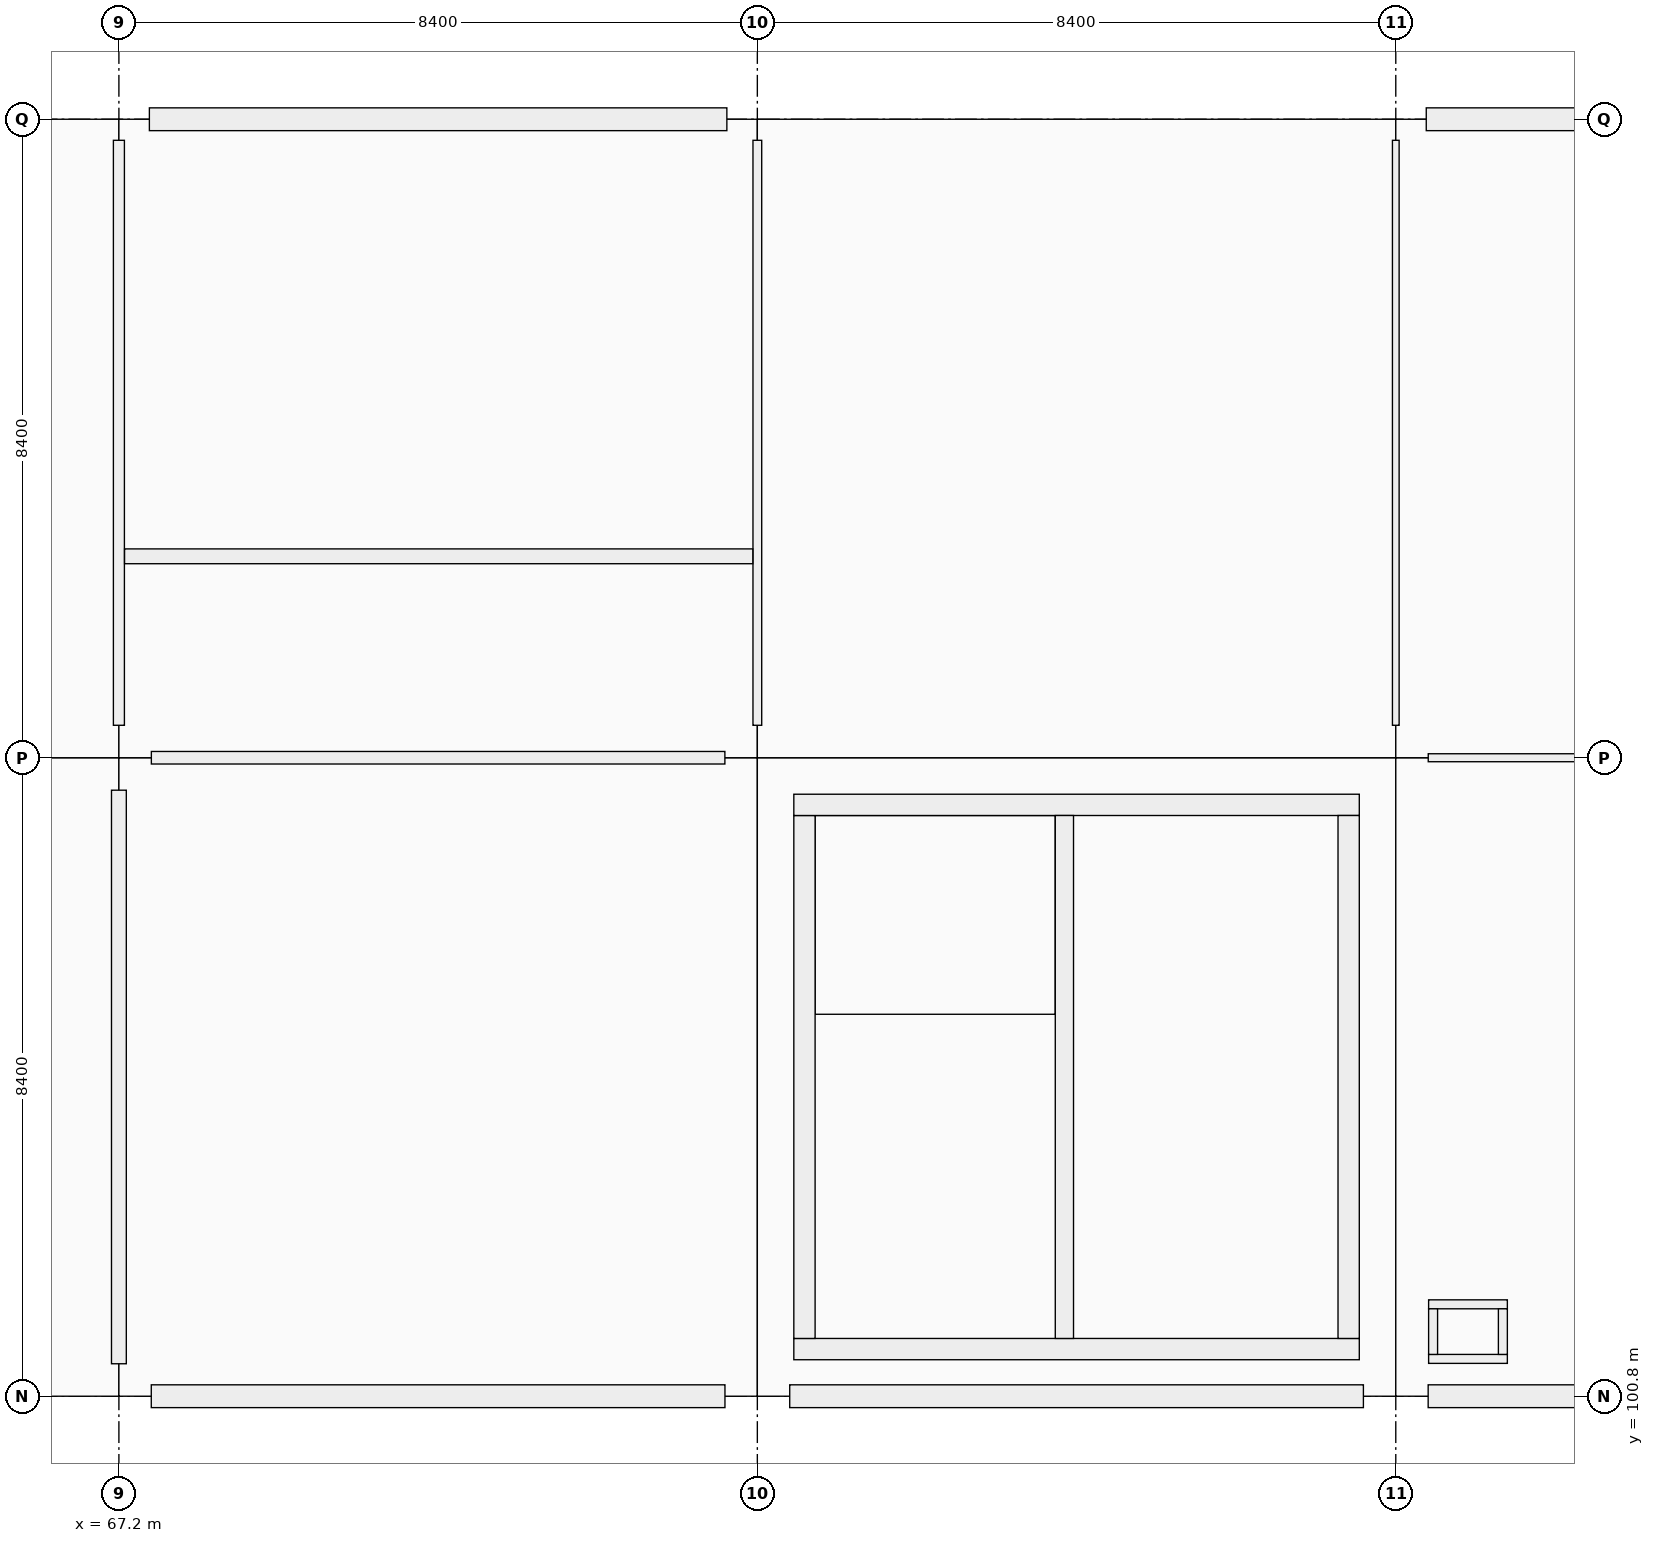
"""IFC4 building model, lengths in metres.
Left out: names, types, materials, properties, quantities, classifications, styles, units other than length and angle.
Written with IfcOpenShell. Run it as: python <this file> out.ifc"""

import sys

from ifc_helpers import new_model, si_unit, direction, frame, frame_2d, origin, origin_2d, place, context, subcontext, project, spatial, rectangle, extrude, element, fill, save


model = new_model("IFC4")
c1 = context("Model", 3, precision=1e-05, world=origin(), true_north=direction((0.0, 1.0)))
c2 = subcontext(c1, "Body", "Model", "MODEL_VIEW")
j1 = project(units=[si_unit("LENGTHUNIT", "METRE"), si_unit("PLANEANGLEUNIT", "RADIAN")], contexts=[c1])
p1 = place(None, origin())
s1 = spatial("IfcSite", under=j1, at=p1, CompositionType="ELEMENT")
p2 = place(p1, origin())
s2 = spatial("IfcBuilding", under=s1, at=p2, CompositionType="ELEMENT")
p3 = place(p2, frame((0.0, 0.0, 10.26)))
s3 = spatial("IfcBuildingStorey", under=s2, at=p3, CompositionType="ELEMENT", Elevation=10.26)
for number, where, z_axis, x_axis in (
    (1, (67.2, 100.8, 0.0), (0.0, 0.0, 1.0), (1.0, 0.0, 0.0)),
    (2, (67.2, 109.2, 0.0), (0.0, 0.0, 1.0), (1.0, 0.0, 0.0)),
):
    element("IfcColumn", number, at=place(p3, frame(where, z_axis=z_axis, x_axis=x_axis)), inside=s3, PredefinedType="COLUMN", context=c2, shape_type="SweptSolid", body=[
        extrude(rectangle(XDim=0.85, YDim=0.85, at=origin_2d()), origin(), (0.0, 0.0, 1.0), 4.5),
    ])
p4 = place(p3, frame((67.2, 117.6, 0.0), z_axis=(0.0, 0.0, 1.0), x_axis=(1.0, 0.0, 0.0)))
e3 = element("IfcColumn", 3, at=p4, inside=s3, PredefinedType="COLUMN", context=c2, shape_type="SweptSolid", body=[
    extrude(rectangle(XDim=0.8, YDim=0.55, at=origin_2d()), origin(), (0.0, 0.0, 1.0), 4.5),
])
for number, where, z_axis, x_axis in (
    (4, (75.6, 100.8, 0.0), (0.0, 0.0, 1.0), (1.0, 0.0, 0.0)),
    (5, (75.6, 109.2, 0.0), (0.0, 0.0, 1.0), (1.0, 0.0, 0.0)),
):
    element("IfcColumn", number, at=place(p3, frame(where, z_axis=z_axis, x_axis=x_axis)), inside=s3, PredefinedType="COLUMN", context=c2, shape_type="SweptSolid", body=[
        extrude(rectangle(XDim=0.85, YDim=0.85, at=origin_2d()), origin(), (0.0, 0.0, 1.0), 4.5),
    ])
p5 = place(p3, frame((75.6, 117.6, 0.0), z_axis=(0.0, 0.0, 1.0), x_axis=(1.0, 0.0, 0.0)))
e6 = element("IfcColumn", 6, at=p5, inside=s3, PredefinedType="COLUMN", context=c2, shape_type="SweptSolid", body=[
    extrude(rectangle(XDim=0.8, YDim=0.55, at=origin_2d()), origin(), (0.0, 0.0, 1.0), 4.5),
])
for number, where, z_axis, x_axis in (
    (7, (84.0, 100.8, 0.0), (0.0, 0.0, 1.0), (1.0, 0.0, 0.0)),
    (8, (84.0, 109.2, 0.0), (0.0, 0.0, 1.0), (1.0, 0.0, 0.0)),
):
    element("IfcColumn", number, at=place(p3, frame(where, z_axis=z_axis, x_axis=x_axis)), inside=s3, PredefinedType="COLUMN", context=c2, shape_type="SweptSolid", body=[
        extrude(rectangle(XDim=0.85, YDim=0.85, at=origin_2d()), origin(), (0.0, 0.0, 1.0), 4.5),
    ])
p6 = place(p3, frame((84.0, 117.6, 0.0), z_axis=(0.0, 0.0, 1.0), x_axis=(1.0, 0.0, 0.0)))
e9 = element("IfcColumn", 9, at=p6, inside=s3, PredefinedType="COLUMN", context=c2, shape_type="SweptSolid", body=[
    extrude(rectangle(XDim=0.8, YDim=0.55, at=origin_2d()), origin(), (0.0, 0.0, 1.0), 4.5),
])
p7 = place(p3, frame((75.174, 100.8, 0.0), z_axis=(0.0, 0.0, 1.0), x_axis=(-1.0, 0.0, 0.0)))
e10 = element("IfcWall", 10, at=p7, inside=s3, PredefinedType="SOLIDWALL", context=c2, shape_type="SweptSolid", body=[
    extrude(rectangle(XDim=7.548, YDim=0.3, at=frame_2d((3.774, 0.0))), origin(), (0.0, 0.0, 1.0), 3.54),
])
p8 = place(p3, frame((67.601, 117.6, 0.0), z_axis=(0.0, 0.0, 1.0), x_axis=(1.0, 0.0, 0.0)))
e11 = element("IfcWall", 11, at=p8, inside=s3, PredefinedType="SOLIDWALL", context=c2, shape_type="SweptSolid", body=[
    extrude(rectangle(XDim=7.598, YDim=0.3, at=frame_2d((3.799, 0.0))), origin(), (0.0, 0.0, 1.0), 3.54),
])
p9 = place(p8, frame((3.124, 0.0, 0.9)))
e12 = element("IfcOpeningElement", 12, at=p9, cuts=e11, PredefinedType="OPENING", context=c2, shape_type="SweptSolid", body=[
    extrude(rectangle(XDim=1.35, YDim=1.5, at=frame_2d((0.675, 0.75))), frame((0.0, 0.15, 0.0), z_axis=(0.0, -1.0, 0.0), x_axis=(1.0, 0.0, 0.0)), (0.0, 0.0, 1.0), 0.3),
])
p10 = place(p3, frame((83.574, 100.8, 0.0), z_axis=(0.0, 0.0, 1.0), x_axis=(-1.0, 0.0, 0.0)))
e13 = element("IfcWall", 13, at=p10, inside=s3, PredefinedType="SOLIDWALL", context=c2, shape_type="SweptSolid", body=[
    extrude(rectangle(XDim=7.548, YDim=0.3, at=frame_2d((3.774, 0.0))), origin(), (0.0, 0.0, 1.0), 3.54),
])
p11 = place(p3, frame((91.974, 100.8, 0.0), z_axis=(0.0, 0.0, 1.0), x_axis=(-1.0, 0.0, 0.0)))
e14 = element("IfcWall", 14, at=p11, inside=s3, PredefinedType="SOLIDWALL", context=c2, shape_type="SweptSolid", body=[
    extrude(rectangle(XDim=7.548, YDim=0.3, at=frame_2d((3.774, 0.0))), origin(), (0.0, 0.0, 1.0), 3.54),
])
p12 = place(p11, frame((3.324, 0.0, 0.9)))
e15 = element("IfcOpeningElement", 15, at=p12, cuts=e14, PredefinedType="OPENING", context=c2, shape_type="SweptSolid", body=[
    extrude(rectangle(XDim=0.9, YDim=1.5, at=frame_2d((0.45, 0.75))), frame((0.0, 0.15, 0.0), z_axis=(0.0, -1.0, 0.0), x_axis=(1.0, 0.0, 0.0)), (0.0, 0.0, 1.0), 0.3),
])
p13 = place(p3, frame((84.401, 117.6, 0.0), z_axis=(0.0, 0.0, 1.0), x_axis=(1.0, 0.0, 0.0)))
e16 = element("IfcWall", 16, at=p13, inside=s3, PredefinedType="SOLIDWALL", context=c2, shape_type="SweptSolid", body=[
    extrude(rectangle(XDim=7.598, YDim=0.3, at=frame_2d((3.799, 0.0))), origin(), (0.0, 0.0, 1.0), 3.54),
])
p14 = place(p13, frame((2.949, 0.0, 0.9)))
e17 = element("IfcOpeningElement", 17, at=p14, cuts=e16, PredefinedType="OPENING", context=c2, shape_type="SweptSolid", body=[
    extrude(rectangle(XDim=1.7, YDim=1.85, at=frame_2d((0.85, 0.925))), frame((0.0, 0.15, 0.0), z_axis=(0.0, -1.0, 0.0), x_axis=(1.0, 0.0, 0.0)), (0.0, 0.0, 1.0), 0.3),
])
p15 = place(p3, frame((83.52, 101.42, 0.0), z_axis=(0.0, 0.0, 1.0), x_axis=(-1.0, 0.0, 0.0)))
e18 = element("IfcWall", 18, at=p15, inside=s3, PredefinedType="SHEAR", context=c2, shape_type="SweptSolid", body=[
    extrude(rectangle(XDim=7.44, YDim=0.28, at=frame_2d((3.72, 0.0))), origin(), (0.0, 0.0, 1.0), 4.5),
])
p16 = place(p3, frame((76.22, 101.56, 0.0), z_axis=(0.0, 0.0, 1.0), x_axis=(0.0, 1.0, 0.0)))
e19 = element("IfcWall", 19, at=p16, inside=s3, PredefinedType="SHEAR", context=c2, shape_type="SweptSolid", body=[
    extrude(rectangle(XDim=6.88, YDim=0.28, at=frame_2d((3.44, 0.0))), origin(), (0.0, 0.0, 1.0), 4.5),
])
p17 = place(p3, frame((76.08, 108.58, 0.0), z_axis=(0.0, 0.0, 1.0), x_axis=(1.0, 0.0, 0.0)))
e20 = element("IfcWall", 20, at=p17, inside=s3, PredefinedType="SHEAR", context=c2, shape_type="SweptSolid", body=[
    extrude(rectangle(XDim=7.44, YDim=0.28, at=frame_2d((3.72, 0.0))), origin(), (0.0, 0.0, 1.0), 4.5),
])
p18 = place(p3, frame((83.38, 108.44, 0.0), z_axis=(0.0, 0.0, 1.0), x_axis=(0.0, -1.0, 0.0)))
e21 = element("IfcWall", 21, at=p18, inside=s3, PredefinedType="SHEAR", context=c2, shape_type="SweptSolid", body=[
    extrude(rectangle(XDim=6.88, YDim=0.28, at=frame_2d((3.44, 0.0))), origin(), (0.0, 0.0, 1.0), 4.5),
])
p19 = place(p18, frame((3.99, 0.0, 0.0)))
e22 = element("IfcOpeningElement", 22, at=p19, cuts=e21, PredefinedType="OPENING", context=c2, shape_type="SweptSolid", body=[
    extrude(rectangle(XDim=1.5, YDim=2.15, at=frame_2d((0.75, 1.075))), frame((0.0, 0.14, 0.0), z_axis=(0.0, -1.0, 0.0), x_axis=(1.0, 0.0, 0.0)), (0.0, 0.0, 1.0), 0.28),
])
p20 = place(p3, frame((79.64, 101.56, 0.0), z_axis=(0.0, 0.0, 1.0), x_axis=(0.0, 1.0, 0.0)))
e23 = element("IfcWall", 23, at=p20, inside=s3, PredefinedType="SHEAR", context=c2, shape_type="SweptSolid", body=[
    extrude(rectangle(XDim=6.88, YDim=0.24, at=frame_2d((3.44, 0.0))), origin(), (0.0, 0.0, 1.0), 4.5),
])
p21 = place(p20, frame((0.12, 0.0, 0.0)))
e24 = element("IfcOpeningElement", 24, at=p21, cuts=e23, PredefinedType="OPENING", context=c2, shape_type="SweptSolid", body=[
    extrude(rectangle(XDim=1.0, YDim=2.15, at=frame_2d((0.5, 1.075))), frame((0.0, 0.12, 0.0), z_axis=(0.0, -1.0, 0.0), x_axis=(1.0, 0.0, 0.0)), (0.0, 0.0, 1.0), 0.24),
])
for number, where, z_axis, x_axis in (
    (25, (84.432, 101.291, 0.0), (0.0, 0.0, 1.0), (1.0, 0.0, 0.0)),
    (26, (84.432, 102.009, 0.0), (0.0, 0.0, 1.0), (1.0, 0.0, 0.0)),
):
    element("IfcWall", number, at=place(p3, frame(where, z_axis=z_axis, x_axis=x_axis)), inside=s3, PredefinedType="PARTITIONING", context=c2, shape_type="SweptSolid", body=[
        extrude(rectangle(XDim=1.036, YDim=0.118, at=frame_2d((0.518, 0.0))), origin(), (0.0, 0.0, 1.0), 3.53),
    ])
for number, where, z_axis, x_axis in (
    (27, (84.491, 101.35, 0.0), (0.0, 0.0, 1.0), (0.0, 1.0, 0.0)),
    (28, (85.409, 101.35, 0.0), (0.0, 0.0, 1.0), (0.0, 1.0, 0.0)),
):
    element("IfcWall", number, at=place(p3, frame(where, z_axis=z_axis, x_axis=x_axis)), inside=s3, PredefinedType="PARTITIONING", context=c2, shape_type="SweptSolid", body=[
        extrude(rectangle(XDim=0.6, YDim=0.118, at=frame_2d((0.3, 0.0))), origin(), (0.0, 0.0, 1.0), 3.53),
    ])
p22 = place(p3, frame((67.627, 109.2, 0.0), z_axis=(0.0, 0.0, 1.0), x_axis=(1.0, 0.0, 0.0)))
e29 = element("IfcWall", 29, at=p22, inside=s3, PredefinedType="PARTITIONING", context=c2, shape_type="SweptSolid", body=[
    extrude(rectangle(XDim=7.546, YDim=0.165, at=frame_2d((3.773, 0.0))), origin(), (0.0, 0.0, 1.0), 3.37),
])
p23 = place(p3, frame((84.427, 109.2, 0.0), z_axis=(0.0, 0.0, 1.0), x_axis=(1.0, 0.0, 0.0)))
e30 = element("IfcWall", 30, at=p23, inside=s3, PredefinedType="PARTITIONING", context=c2, shape_type="SweptSolid", body=[
    extrude(rectangle(XDim=7.546, YDim=0.105, at=frame_2d((3.773, 0.0))), origin(), (0.0, 0.0, 1.0), 3.37),
])
p24 = place(p23, frame((3.288, 0.0, 0.0)))
e31 = element("IfcOpeningElement", 31, at=p24, cuts=e30, PredefinedType="OPENING", context=c2, shape_type="SweptSolid", body=[
    extrude(rectangle(XDim=0.97, YDim=2.12, at=frame_2d((0.485, 1.06))), frame((0.0, 0.052, 0.0), z_axis=(0.0, -1.0, 0.0), x_axis=(1.0, 0.0, 0.0)), (0.0, 0.0, 1.0), 0.105),
])
p25 = place(p3, frame((67.2, 101.227, 0.0), z_axis=(0.0, 0.0, 1.0), x_axis=(0.0, 1.0, 0.0)))
e32 = element("IfcWall", 32, at=p25, inside=s3, PredefinedType="PARTITIONING", context=c2, shape_type="SweptSolid", body=[
    extrude(rectangle(XDim=7.546, YDim=0.195, at=frame_2d((3.773, 0.0))), origin(), (0.0, 0.0, 1.0), 3.37),
])
p26 = place(p25, frame((3.273, 0.0, 0.0)))
e33 = element("IfcOpeningElement", 33, at=p26, cuts=e32, PredefinedType="OPENING", context=c2, shape_type="SweptSolid", body=[
    extrude(rectangle(XDim=1.0, YDim=2.2, at=frame_2d((0.5, 1.1))), frame((0.0, 0.098, 0.0), z_axis=(0.0, -1.0, 0.0), x_axis=(1.0, 0.0, 0.0)), (0.0, 0.0, 1.0), 0.195),
])
p27 = place(p3, frame((67.2, 109.627, 0.0), z_axis=(0.0, 0.0, 1.0), x_axis=(0.0, 1.0, 0.0)))
e34 = element("IfcWall", 34, at=p27, inside=s3, PredefinedType="PARTITIONING", context=c2, shape_type="SweptSolid", body=[
    extrude(rectangle(XDim=7.696, YDim=0.145, at=frame_2d((3.848, 0.0))), origin(), (0.0, 0.0, 1.0), 3.37),
])
p28 = place(p27, frame((0.558, 0.0, 0.0)))
e35 = element("IfcOpeningElement", 35, at=p28, cuts=e34, PredefinedType="OPENING", context=c2, shape_type="SweptSolid", body=[
    extrude(rectangle(XDim=0.96, YDim=2.1, at=frame_2d((0.48, 1.05))), frame((0.0, 0.073, 0.0), z_axis=(0.0, -1.0, 0.0), x_axis=(1.0, 0.0, 0.0)), (0.0, 0.0, 1.0), 0.145),
])
p29 = place(p27, frame((4.498, 0.0, 0.0)))
e36 = element("IfcOpeningElement", 36, at=p29, cuts=e34, PredefinedType="OPENING", context=c2, shape_type="SweptSolid", body=[
    extrude(rectangle(XDim=0.92, YDim=2.1, at=frame_2d((0.46, 1.05))), frame((0.0, 0.073, 0.0), z_axis=(0.0, -1.0, 0.0), x_axis=(1.0, 0.0, 0.0)), (0.0, 0.0, 1.0), 0.145),
])
p30 = place(p3, frame((75.6, 109.627, 0.0), z_axis=(0.0, 0.0, 1.0), x_axis=(0.0, 1.0, 0.0)))
e37 = element("IfcWall", 37, at=p30, inside=s3, PredefinedType="PARTITIONING", context=c2, shape_type="SweptSolid", body=[
    extrude(rectangle(XDim=7.696, YDim=0.115, at=frame_2d((3.848, 0.0))), origin(), (0.0, 0.0, 1.0), 3.37),
])
p31 = place(p3, frame((84.0, 109.627, 0.0), z_axis=(0.0, 0.0, 1.0), x_axis=(0.0, 1.0, 0.0)))
e38 = element("IfcWall", 38, at=p31, inside=s3, PredefinedType="PARTITIONING", context=c2, shape_type="SweptSolid", body=[
    extrude(rectangle(XDim=7.696, YDim=0.088, at=frame_2d((3.848, 0.0))), origin(), (0.0, 0.0, 1.0), 3.37),
])
p32 = place(p31, frame((3.343, 0.0, 0.0)))
e39 = element("IfcOpeningElement", 39, at=p32, cuts=e38, PredefinedType="OPENING", context=c2, shape_type="SweptSolid", body=[
    extrude(rectangle(XDim=1.01, YDim=2.12, at=frame_2d((0.505, 1.06))), frame((0.0, 0.044, 0.0), z_axis=(0.0, -1.0, 0.0), x_axis=(1.0, 0.0, 0.0)), (0.0, 0.0, 1.0), 0.088),
])
p33 = place(p3, frame((67.274, 111.85, 0.0), z_axis=(0.0, 0.0, 1.0), x_axis=(1.0, 0.0, 0.0)))
e40 = element("IfcWall", 40, at=p33, inside=s3, PredefinedType="PARTITIONING", context=c2, shape_type="SweptSolid", body=[
    extrude(rectangle(XDim=8.266, YDim=0.195, at=frame_2d((4.133, 0.0))), origin(), (0.0, 0.0, 1.0), 3.37),
])
p34 = place(p9, origin())
e41 = element("IfcWindow", 41, at=p34, inside=s3, PartitioningType="SINGLE_PANEL", PredefinedType="WINDOW", context=c2, shape_type="SweptSolid", body=[
    extrude(rectangle(XDim=1.35, YDim=1.5, at=frame_2d((0.675, 0.75))), frame((0.0, 0.03, 0.0), z_axis=(0.0, -1.0, 0.0), x_axis=(1.0, 0.0, 0.0)), (0.0, 0.0, 1.0), 0.06),
])
fill(e12, e41)
p35 = place(p21, origin())
e42 = element("IfcDoor", 42, at=p35, inside=s3, OperationType="SINGLE_SWING_RIGHT", PredefinedType="DOOR", context=c2, shape_type="SweptSolid", body=[
    extrude(rectangle(XDim=1.0, YDim=2.15, at=frame_2d((0.5, 1.075))), frame((0.0, 0.025, 0.0), z_axis=(0.0, -1.0, 0.0), x_axis=(1.0, 0.0, 0.0)), (0.0, 0.0, 1.0), 0.05),
])
fill(e24, e42)
p36 = place(p19, origin())
e43 = element("IfcDoor", 43, at=p36, inside=s3, OperationType="DOUBLE_DOOR_SINGLE_SWING", PredefinedType="DOOR", context=c2, shape_type="SweptSolid", body=[
    extrude(rectangle(XDim=1.5, YDim=2.15, at=frame_2d((0.75, 1.075))), frame((0.0, 0.025, 0.0), z_axis=(0.0, -1.0, 0.0), x_axis=(1.0, 0.0, 0.0)), (0.0, 0.0, 1.0), 0.05),
])
fill(e22, e43)
p37 = place(p28, origin())
e44 = element("IfcDoor", 44, at=p37, inside=s3, OperationType="SINGLE_SWING_RIGHT", PredefinedType="DOOR", context=c2, shape_type="SweptSolid", body=[
    extrude(rectangle(XDim=0.96, YDim=2.1, at=frame_2d((0.48, 1.05))), frame((0.0, 0.025, 0.0), z_axis=(0.0, -1.0, 0.0), x_axis=(1.0, 0.0, 0.0)), (0.0, 0.0, 1.0), 0.05),
])
fill(e35, e44)
p38 = place(p29, origin())
e45 = element("IfcDoor", 45, at=p38, inside=s3, OperationType="SINGLE_SWING_LEFT", PredefinedType="DOOR", context=c2, shape_type="SweptSolid", body=[
    extrude(rectangle(XDim=0.92, YDim=2.1, at=frame_2d((0.46, 1.05))), frame((0.0, 0.025, 0.0), z_axis=(0.0, -1.0, 0.0), x_axis=(1.0, 0.0, 0.0)), (0.0, 0.0, 1.0), 0.05),
])
fill(e36, e45)
p39 = place(p26, origin())
e46 = element("IfcDoor", 46, at=p39, inside=s3, OperationType="SINGLE_SWING_LEFT", PredefinedType="DOOR", context=c2, shape_type="SweptSolid", body=[
    extrude(rectangle(XDim=1.0, YDim=2.2, at=frame_2d((0.5, 1.1))), frame((0.0, 0.025, 0.0), z_axis=(0.0, -1.0, 0.0), x_axis=(1.0, 0.0, 0.0)), (0.0, 0.0, 1.0), 0.05),
])
fill(e33, e46)
p40 = place(p32, origin())
e47 = element("IfcDoor", 47, at=p40, inside=s3, OperationType="SINGLE_SWING_RIGHT", PredefinedType="DOOR", context=c2, shape_type="SweptSolid", body=[
    extrude(rectangle(XDim=1.01, YDim=2.12, at=frame_2d((0.505, 1.06))), frame((0.0, 0.025, 0.0), z_axis=(0.0, -1.0, 0.0), x_axis=(1.0, 0.0, 0.0)), (0.0, 0.0, 1.0), 0.05),
])
fill(e39, e47)
save(model, sys.argv[1])
